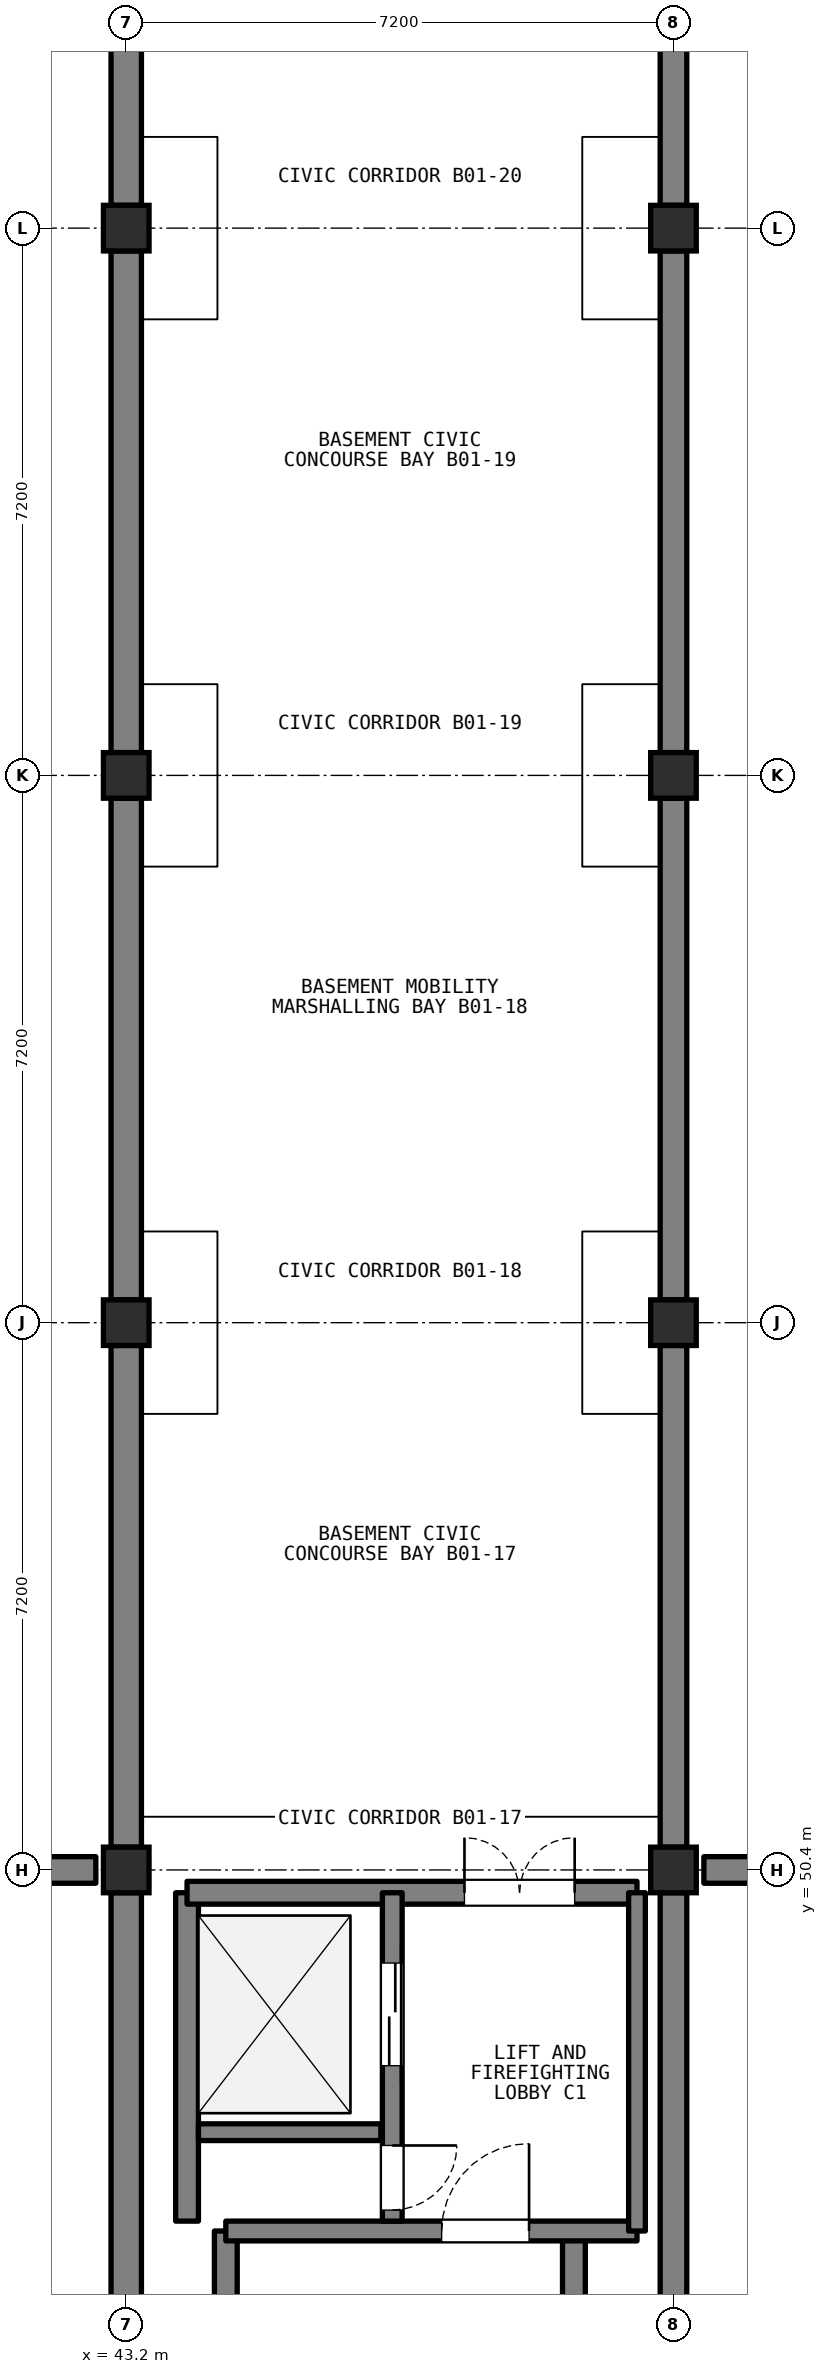
"""IFC4 building model, lengths in metres.
Left out: names, types, materials, properties, quantities, classifications, styles, units other than length and angle.
Written with IfcOpenShell. Run it as: python <this file> out.ifc"""

import sys

from ifc_helpers import new_model, si_unit, direction, frame, frame_2d, origin, origin_2d, place, context, subcontext, project, spatial, rectangle, extrude, element, fill, save


model = new_model("IFC4")
c1 = context("Model", 3, precision=1e-05, world=origin(), true_north=direction((0.0, 1.0)))
c2 = subcontext(c1, "Body", "Model", "MODEL_VIEW")
j1 = project(units=[si_unit("LENGTHUNIT", "METRE"), si_unit("PLANEANGLEUNIT", "RADIAN")], contexts=[c1])
p1 = place(None, origin())
s1 = spatial("IfcSite", under=j1, at=p1, CompositionType="ELEMENT")
p2 = place(p1, origin())
s2 = spatial("IfcBuilding", under=s1, at=p2, CompositionType="ELEMENT")
p3 = place(p2, frame((0.0, 0.0, -4.2)))
s3 = spatial("IfcBuildingStorey", under=s2, at=p3, CompositionType="ELEMENT", Elevation=-4.2)
p4 = place(p3, frame((43.2, 43.5, 0.0), z_axis=(0.0, 0.0, 1.0), x_axis=(0.0, 1.0, 0.0)))
e1 = element("IfcWall", 1, at=p4, inside=s3, PredefinedType="USERDEFINED", context=c2, shape_type="SweptSolid", body=[
    extrude(rectangle(XDim=6.6, YDim=0.4, at=frame_2d((3.3, 0.0))), origin(), (0.0, 0.0, 1.0), 3.98),
])
p5 = place(p3, frame((50.4, 43.5, 0.0), z_axis=(0.0, 0.0, 1.0), x_axis=(0.0, 1.0, 0.0)))
e2 = element("IfcWall", 2, at=p5, inside=s3, PredefinedType="USERDEFINED", context=c2, shape_type="SweptSolid", body=[
    extrude(rectangle(XDim=6.6, YDim=0.35, at=frame_2d((3.3, 0.0))), origin(), (0.0, 0.0, 1.0), 3.98),
])
p6 = place(p3, frame((43.2, 50.7, 0.0), z_axis=(0.0, 0.0, 1.0), x_axis=(0.0, 1.0, 0.0)))
e3 = element("IfcWall", 3, at=p6, inside=s3, PredefinedType="USERDEFINED", context=c2, shape_type="SweptSolid", body=[
    extrude(rectangle(XDim=6.6, YDim=0.4, at=frame_2d((3.3, 0.0))), origin(), (0.0, 0.0, 1.0), 3.98),
])
p7 = place(p3, frame((50.4, 50.7, 0.0), z_axis=(0.0, 0.0, 1.0), x_axis=(0.0, 1.0, 0.0)))
e4 = element("IfcWall", 4, at=p7, inside=s3, PredefinedType="USERDEFINED", context=c2, shape_type="SweptSolid", body=[
    extrude(rectangle(XDim=6.6, YDim=0.35, at=frame_2d((3.3, 0.0))), origin(), (0.0, 0.0, 1.0), 3.98),
])
p8 = place(p3, frame((43.2, 57.9, 0.0), z_axis=(0.0, 0.0, 1.0), x_axis=(0.0, 1.0, 0.0)))
e5 = element("IfcWall", 5, at=p8, inside=s3, PredefinedType="USERDEFINED", context=c2, shape_type="SweptSolid", body=[
    extrude(rectangle(XDim=6.6, YDim=0.4, at=frame_2d((3.3, 0.0))), origin(), (0.0, 0.0, 1.0), 3.98),
])
p9 = place(p3, frame((50.4, 57.9, 0.0), z_axis=(0.0, 0.0, 1.0), x_axis=(0.0, 1.0, 0.0)))
e6 = element("IfcWall", 6, at=p9, inside=s3, PredefinedType="USERDEFINED", context=c2, shape_type="SweptSolid", body=[
    extrude(rectangle(XDim=6.6, YDim=0.35, at=frame_2d((3.3, 0.0))), origin(), (0.0, 0.0, 1.0), 3.98),
])
p10 = place(p3, frame((43.2, 65.1, 0.0), z_axis=(0.0, 0.0, 1.0), x_axis=(0.0, 1.0, 0.0)))
e7 = element("IfcWall", 7, at=p10, inside=s3, PredefinedType="USERDEFINED", context=c2, shape_type="SweptSolid", body=[
    extrude(rectangle(XDim=6.6, YDim=0.4, at=frame_2d((3.3, 0.0))), origin(), (0.0, 0.0, 1.0), 3.98),
])
p11 = place(p3, frame((50.4, 65.1, 0.0), z_axis=(0.0, 0.0, 1.0), x_axis=(0.0, 1.0, 0.0)))
e8 = element("IfcWall", 8, at=p11, inside=s3, PredefinedType="USERDEFINED", context=c2, shape_type="SweptSolid", body=[
    extrude(rectangle(XDim=6.6, YDim=0.35, at=frame_2d((3.3, 0.0))), origin(), (0.0, 0.0, 1.0), 3.98),
])
p12 = place(p3, frame((43.2, 72.3, 0.0), z_axis=(0.0, 0.0, 1.0), x_axis=(0.0, 1.0, 0.0)))
e9 = element("IfcWall", 9, at=p12, inside=s3, PredefinedType="USERDEFINED", context=c2, shape_type="SweptSolid", body=[
    extrude(rectangle(XDim=6.6, YDim=0.4, at=frame_2d((3.3, 0.0))), origin(), (0.0, 0.0, 1.0), 3.98),
])
p13 = place(p3, frame((50.4, 72.3, 0.0), z_axis=(0.0, 0.0, 1.0), x_axis=(0.0, 1.0, 0.0)))
e10 = element("IfcWall", 10, at=p13, inside=s3, PredefinedType="USERDEFINED", context=c2, shape_type="SweptSolid", body=[
    extrude(rectangle(XDim=6.6, YDim=0.35, at=frame_2d((3.3, 0.0))), origin(), (0.0, 0.0, 1.0), 3.98),
])
p14 = place(p3, frame((36.4, 50.4, 0.0), z_axis=(0.0, 0.0, 1.0), x_axis=(1.0, 0.0, 0.0)))
e11 = element("IfcWall", 11, at=p14, inside=s3, PredefinedType="USERDEFINED", context=c2, shape_type="SweptSolid", body=[
    extrude(rectangle(XDim=6.4, YDim=0.35, at=frame_2d((3.2, 0.0))), origin(), (0.0, 0.0, 1.0), 3.98),
])
p15 = place(p3, frame((50.8, 50.4, 0.0), z_axis=(0.0, 0.0, 1.0), x_axis=(1.0, 0.0, 0.0)))
e12 = element("IfcWall", 12, at=p15, inside=s3, PredefinedType="USERDEFINED", context=c2, shape_type="SweptSolid", body=[
    extrude(rectangle(XDim=6.4, YDim=0.35, at=frame_2d((3.2, 0.0))), origin(), (0.0, 0.0, 1.0), 3.98),
])
for number, where, z_axis, x_axis in (
    (13, (43.2, 50.4, 0.0), (0.0, 0.0, 1.0), (1.0, 0.0, 0.0)),
    (14, (43.2, 57.6, 0.0), (0.0, 0.0, 1.0), (1.0, 0.0, 0.0)),
    (15, (43.2, 64.8, 0.0), (0.0, 0.0, 1.0), (1.0, 0.0, 0.0)),
    (16, (43.2, 72.0, 0.0), (0.0, 0.0, 1.0), (1.0, 0.0, 0.0)),
    (17, (50.4, 50.4, 0.0), (0.0, 0.0, 1.0), (1.0, 0.0, 0.0)),
    (18, (50.4, 57.6, 0.0), (0.0, 0.0, 1.0), (1.0, 0.0, 0.0)),
    (19, (50.4, 64.8, 0.0), (0.0, 0.0, 1.0), (1.0, 0.0, 0.0)),
    (20, (50.4, 72.0, 0.0), (0.0, 0.0, 1.0), (1.0, 0.0, 0.0)),
):
    element("IfcColumn", number, at=place(p3, frame(where, z_axis=z_axis, x_axis=x_axis)), inside=s3, PredefinedType="COLUMN", context=c2, shape_type="SweptSolid", body=[
        extrude(rectangle(XDim=0.6, YDim=0.6, at=origin_2d()), origin(), (0.0, 0.0, 1.0), 4.2),
    ])
for number, where, z_axis, x_axis in (
    (21, (44.51, 36.35, 0.0), (0.0, 0.0, 1.0), (0.0, 1.0, 0.0)),
    (22, (49.09, 36.35, 0.0), (0.0, 0.0, 1.0), (0.0, 1.0, 0.0)),
):
    element("IfcWall", number, at=place(p3, frame(where, z_axis=z_axis, x_axis=x_axis)), inside=s3, PredefinedType="SHEAR", context=c2, shape_type="SweptSolid", body=[
        extrude(rectangle(XDim=9.3, YDim=0.3, at=frame_2d((4.65, 0.0))), origin(), (0.0, 0.0, 1.0), 3.98),
    ])
p16 = place(p3, frame((44.51, 45.65, 0.0), z_axis=(0.0, 0.0, 1.0), x_axis=(1.0, 0.0, 0.0)))
e23 = element("IfcWall", 23, at=p16, inside=s3, PredefinedType="SHEAR", context=c2, shape_type="SweptSolid", body=[
    extrude(rectangle(XDim=5.41, YDim=0.26, at=frame_2d((2.705, 0.0))), origin(), (0.0, 0.0, 1.0), 3.98),
])
p17 = place(p16, frame((2.84, 0.0, 0.0)))
e24 = element("IfcOpeningElement", 24, at=p17, cuts=e23, PredefinedType="OPENING", context=c2, shape_type="SweptSolid", body=[
    extrude(rectangle(XDim=1.15, YDim=2.15, at=frame_2d((0.575, 1.075))), frame((0.0, 0.14, 0.0), z_axis=(0.0, -1.0, 0.0), x_axis=(1.0, 0.0, 0.0)), (0.0, 0.0, 1.0), 0.28),
])
p18 = place(p3, frame((44.0, 45.78, 0.0), z_axis=(0.0, 0.0, 1.0), x_axis=(0.0, 1.0, 0.0)))
e25 = element("IfcWall", 25, at=p18, inside=s3, PredefinedType="SHEAR", context=c2, shape_type="SweptSolid", body=[
    extrude(rectangle(XDim=4.32, YDim=0.3, at=frame_2d((2.16, 0.0))), origin(), (0.0, 0.0, 1.0), 3.98),
])
p19 = place(p3, frame((44.0, 50.1, 0.0), z_axis=(0.0, 0.0, 1.0), x_axis=(1.0, 0.0, 0.0)))
e26 = element("IfcWall", 26, at=p19, inside=s3, PredefinedType="SHEAR", context=c2, shape_type="SweptSolid", body=[
    extrude(rectangle(XDim=5.92, YDim=0.3, at=frame_2d((2.96, 0.0))), origin(), (0.0, 0.0, 1.0), 3.98),
])
p20 = place(p19, frame((3.65, 0.0, 0.0)))
e27 = element("IfcOpeningElement", 27, at=p20, cuts=e26, PredefinedType="OPENING", context=c2, shape_type="SweptSolid", body=[
    extrude(rectangle(XDim=1.45, YDim=2.2, at=frame_2d((0.725, 1.1))), frame((0.0, 0.16, 0.0), z_axis=(0.0, -1.0, 0.0), x_axis=(1.0, 0.0, 0.0)), (0.0, 0.0, 1.0), 0.32),
])
p21 = place(p3, frame((44.15, 46.95, 0.0), z_axis=(0.0, 0.0, 1.0), x_axis=(1.0, 0.0, 0.0)))
e28 = element("IfcWall", 28, at=p21, inside=s3, PredefinedType="SHEAR", context=c2, shape_type="SweptSolid", body=[
    extrude(rectangle(XDim=2.4, YDim=0.22, at=frame_2d((1.2, 0.0))), origin(), (0.0, 0.0, 1.0), 3.98),
])
p22 = place(p3, frame((46.7, 50.1, 0.0), z_axis=(0.0, 0.0, 1.0), x_axis=(0.0, -1.0, 0.0)))
e29 = element("IfcWall", 29, at=p22, inside=s3, PredefinedType="SHEAR", context=c2, shape_type="SweptSolid", body=[
    extrude(rectangle(XDim=4.32, YDim=0.26, at=frame_2d((2.16, 0.0))), origin(), (0.0, 0.0, 1.0), 3.98),
])
p23 = place(p22, frame((0.925, 0.0, 0.0)))
e30 = element("IfcOpeningElement", 30, at=p23, cuts=e29, PredefinedType="OPENING", context=c2, shape_type="SweptSolid", body=[
    extrude(rectangle(XDim=1.35, YDim=2.2, at=frame_2d((0.675, 1.1))), frame((0.0, 0.14, 0.0), z_axis=(0.0, -1.0, 0.0), x_axis=(1.0, 0.0, 0.0)), (0.0, 0.0, 1.0), 0.28),
])
p24 = place(p22, frame((3.325, 0.0, 0.0)))
e31 = element("IfcOpeningElement", 31, at=p24, cuts=e29, PredefinedType="OPENING", context=c2, shape_type="SweptSolid", body=[
    extrude(rectangle(XDim=0.85, YDim=2.05, at=frame_2d((0.425, 1.025))), frame((0.0, 0.14, 0.0), z_axis=(0.0, -1.0, 0.0), x_axis=(1.0, 0.0, 0.0)), (0.0, 0.0, 1.0), 0.28),
])
p25 = place(p3, frame((49.92, 50.1, 0.0), z_axis=(0.0, 0.0, 1.0), x_axis=(0.0, -1.0, 0.0)))
e32 = element("IfcWall", 32, at=p25, inside=s3, PredefinedType="SHEAR", context=c2, shape_type="SweptSolid", body=[
    extrude(rectangle(XDim=4.45, YDim=0.22, at=frame_2d((2.225, 0.0))), origin(), (0.0, 0.0, 1.0), 3.98),
])
p26 = place(p17, origin())
e33 = element("IfcDoor", 33, at=p26, inside=s3, OperationType="SINGLE_SWING_RIGHT", PredefinedType="DOOR", context=c2, shape_type="SweptSolid", body=[
    extrude(rectangle(XDim=1.15, YDim=2.15, at=frame_2d((0.575, 1.075))), frame((0.0, 0.025, 0.0), z_axis=(0.0, -1.0, 0.0), x_axis=(1.0, 0.0, 0.0)), (0.0, 0.0, 1.0), 0.05),
])
fill(e24, e33)
p27 = place(p23, origin())
e34 = element("IfcDoor", 34, at=p27, inside=s3, OperationType="DOUBLE_DOOR_SLIDING", PredefinedType="DOOR", context=c2, shape_type="SweptSolid", body=[
    extrude(rectangle(XDim=1.35, YDim=2.2, at=frame_2d((0.675, 1.1))), frame((0.0, 0.025, 0.0), z_axis=(0.0, -1.0, 0.0), x_axis=(1.0, 0.0, 0.0)), (0.0, 0.0, 1.0), 0.05),
])
fill(e30, e34)
p28 = place(p24, origin())
e35 = element("IfcDoor", 35, at=p28, inside=s3, OperationType="SINGLE_SWING_LEFT", PredefinedType="DOOR", context=c2, shape_type="SweptSolid", body=[
    extrude(rectangle(XDim=0.85, YDim=2.05, at=frame_2d((0.425, 1.025))), frame((0.0, 0.025, 0.0), z_axis=(0.0, -1.0, 0.0), x_axis=(1.0, 0.0, 0.0)), (0.0, 0.0, 1.0), 0.05),
])
fill(e31, e35)
p29 = place(p20, origin())
e36 = element("IfcDoor", 36, at=p29, inside=s3, OperationType="DOUBLE_DOOR_SINGLE_SWING", PredefinedType="DOOR", context=c2, shape_type="SweptSolid", body=[
    extrude(rectangle(XDim=1.45, YDim=2.2, at=frame_2d((0.725, 1.1))), frame((0.0, 0.025, 0.0), z_axis=(0.0, -1.0, 0.0), x_axis=(1.0, 0.0, 0.0)), (0.0, 0.0, 1.0), 0.05),
])
fill(e27, e36)
save(model, sys.argv[1])
